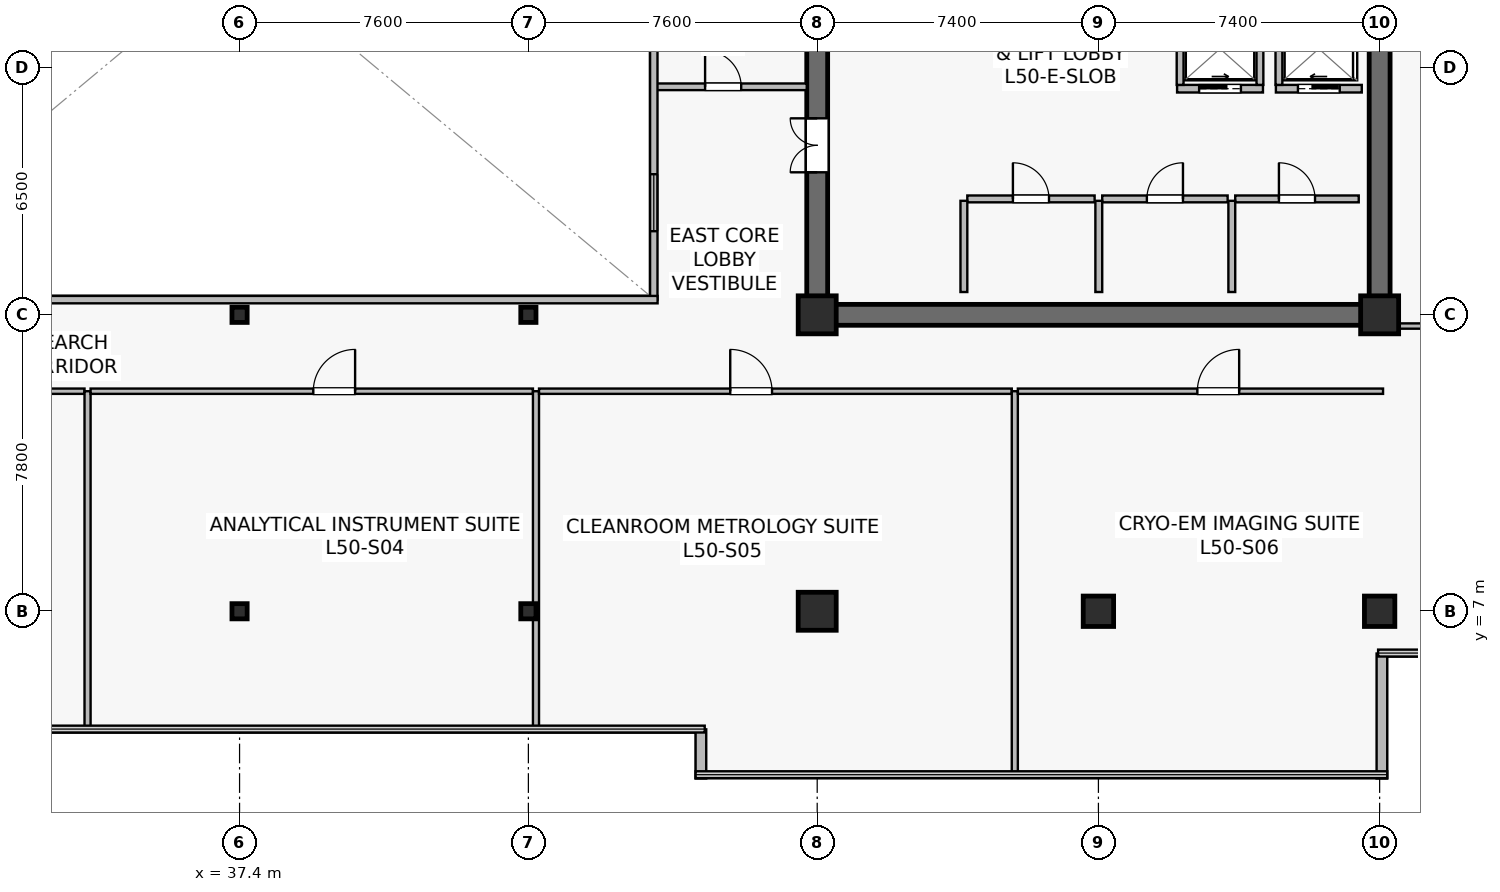
"""IFC4 building model, lengths in metres.
Left out: names, types, materials, properties, quantities, classifications, styles, units other than length and angle.
Written with IfcOpenShell. Run it as: python <this file> out.ifc"""

import sys

from ifc_helpers import new_model, si_unit, direction, frame, frame_2d, origin, origin_2d, place, context, subcontext, project, spatial, rectangle, hollow_rectangle, extrude, source, transform, mapped, element, fill, save


model = new_model("IFC4")
c1 = context("Model", 3, precision=1e-05, world=origin(), true_north=direction((0.0, 1.0)))
c2 = subcontext(c1, "Body", "Model", "MODEL_VIEW")
j1 = project(units=[si_unit("LENGTHUNIT", "METRE"), si_unit("PLANEANGLEUNIT", "RADIAN")], contexts=[c1])
p1 = place(None, origin())
s1 = spatial("IfcSite", under=j1, at=p1, CompositionType="ELEMENT")
p2 = place(p1, origin())
s2 = spatial("IfcBuilding", under=s1, at=p2, CompositionType="ELEMENT")
p3 = place(p2, frame((0.0, 0.0, 209.6)))
s3 = spatial("IfcBuildingStorey", under=s2, at=p3, CompositionType="ELEMENT", Elevation=209.6)
p4 = place(p3, frame((52.325, 14.8, 0.0), z_axis=(0.0, 0.0, 1.0), x_axis=(1.0, 0.0, 0.0)))
e1 = element("IfcWall", 1, at=p4, inside=s3, PredefinedType="SHEAR", context=c2, shape_type="SweptSolid", body=[
    extrude(rectangle(XDim=15.35, YDim=0.55, at=frame_2d((7.675, 0.0))), origin(), (0.0, 0.0, 1.0), 3.8),
])
p5 = place(p3, frame((52.6, 15.075, 0.0), z_axis=(0.0, 0.0, 1.0), x_axis=(0.0, 1.0, 0.0)))
e2 = element("IfcWall", 2, at=p5, inside=s3, PredefinedType="SHEAR", context=c2, shape_type="SweptSolid", body=[
    extrude(rectangle(XDim=18.45, YDim=0.55, at=frame_2d((9.225, 0.0))), origin(), (0.0, 0.0, 1.0), 3.8),
])
p6 = place(p5, frame((3.475, 0.0, 0.0)))
e3 = element("IfcOpeningElement", 3, at=p6, cuts=e2, PredefinedType="OPENING", context=c2, shape_type="SweptSolid", body=[
    extrude(rectangle(XDim=1.42, YDim=2.2, at=frame_2d((0.71, 1.1))), frame((0.0, 0.285, 0.0), z_axis=(0.0, -1.0, 0.0), x_axis=(1.0, 0.0, 0.0)), (0.0, 0.0, 1.0), 0.57),
])
p7 = place(p3, frame((67.4, 15.075, 0.0), z_axis=(0.0, 0.0, 1.0), x_axis=(0.0, 1.0, 0.0)))
e4 = element("IfcWall", 4, at=p7, inside=s3, PredefinedType="SHEAR", context=c2, shape_type="SweptSolid", body=[
    extrude(rectangle(XDim=18.45, YDim=0.55, at=frame_2d((9.225, 0.0))), origin(), (0.0, 0.0, 1.0), 3.8),
])
m1 = source(origin(), c2, "Body", "SweptSolid", [
    extrude(rectangle(XDim=1.0, YDim=1.0, at=origin_2d()), origin(), (0.0, 0.0, 1.0), 4.1),
])
p8 = place(p3, frame((52.6, 7.0, 0.0), z_axis=(0.0, 0.0, 1.0), x_axis=(1.0, 0.0, 0.0)))
e5 = element("IfcColumn", 5, at=p8, inside=s3, PredefinedType="COLUMN", context=c2, shape_type="MappedRepresentation", body=[
    mapped(m1, transform((0.0, 0.0, 0.0), scale=1.0)),
])
m2 = source(origin(), c2, "Body", "SweptSolid", [
    extrude(rectangle(XDim=0.8, YDim=0.8, at=origin_2d()), origin(), (0.0, 0.0, 1.0), 4.1),
])
p9 = place(p3, frame((60.0, 7.0, 0.0), z_axis=(0.0, 0.0, 1.0), x_axis=(1.0, 0.0, 0.0)))
e6 = element("IfcColumn", 6, at=p9, inside=s3, PredefinedType="COLUMN", context=c2, shape_type="MappedRepresentation", body=[
    mapped(m2, transform((0.0, 0.0, 0.0), scale=1.0)),
])
for number, where, z_axis, x_axis in (
    (7, (52.6, 14.8, 0.0), (0.0, 0.0, 1.0), (1.0, 0.0, 0.0)),
    (8, (67.4, 14.8, 0.0), (0.0, 0.0, 1.0), (1.0, 0.0, 0.0)),
):
    element("IfcColumn", number, at=place(p3, frame(where, z_axis=z_axis, x_axis=x_axis)), inside=s3, PredefinedType="COLUMN", context=c2, shape_type="MappedRepresentation", body=[
        mapped(m1, transform((0.0, 0.0, 0.0), scale=1.0)),
    ])
p10 = place(p3, frame((67.4, 7.0, 0.0), z_axis=(0.0, 0.0, 1.0), x_axis=(1.0, 0.0, 0.0)))
e9 = element("IfcColumn", 9, at=p10, inside=s3, PredefinedType="COLUMN", context=c2, shape_type="MappedRepresentation", body=[
    mapped(m2, transform((0.0, 0.0, 0.0), scale=1.0)),
])
m3 = source(origin(), c2, "Body", "SweptSolid", [
    extrude(hollow_rectangle(XDim=0.4, YDim=0.4, WallThickness=0.019, at=origin_2d()), origin(), (0.0, 0.0, 1.0), 4.1),
])
for number, where, z_axis, x_axis in (
    (10, (37.4, 7.0, 0.0), (0.0, 0.0, 1.0), (1.0, 0.0, 0.0)),
    (11, (37.4, 14.8, 0.0), (0.0, 0.0, 1.0), (1.0, 0.0, 0.0)),
    (12, (45.0, 7.0, 0.0), (0.0, 0.0, 1.0), (1.0, 0.0, 0.0)),
    (13, (45.0, 14.8, 0.0), (0.0, 0.0, 1.0), (1.0, 0.0, 0.0)),
):
    element("IfcColumn", number, at=place(p3, frame(where, z_axis=z_axis, x_axis=x_axis)), inside=s3, PredefinedType="COLUMN", context=c2, shape_type="MappedRepresentation", body=[
        mapped(m3, transform((0.0, 0.0, 0.0), scale=1.0)),
    ])
p11 = place(p3, frame((49.54, 3.893, 0.0), z_axis=(0.0, 0.0, 1.0), x_axis=(0.0, -1.0, 0.0)))
e14 = element("IfcWall", 14, at=p11, inside=s3, PredefinedType="STANDARD", context=c2, shape_type="SweptSolid", body=[
    extrude(rectangle(XDim=1.293, YDim=0.28, at=frame_2d((0.646, 0.0))), origin(), (0.0, 0.0, 1.0), 3.8),
])
p12 = place(p3, frame((67.46, 2.6, 0.0), z_axis=(0.0, 0.0, 1.0), x_axis=(0.0, 1.0, 0.0)))
e15 = element("IfcWall", 15, at=p12, inside=s3, PredefinedType="STANDARD", context=c2, shape_type="SweptSolid", body=[
    extrude(rectangle(XDim=3.288, YDim=0.28, at=frame_2d((1.644, 0.0))), origin(), (0.0, 0.0, 1.0), 3.8),
])
p13 = place(p3, frame((64.67, 20.75, 0.0), z_axis=(0.0, 0.0, 1.0), x_axis=(1.0, 0.0, 0.0)))
e16 = element("IfcWall", 16, at=p13, inside=s3, PredefinedType="SOLIDWALL", context=c2, shape_type="SweptSolid", body=[
    extrude(rectangle(XDim=2.26, YDim=0.2, at=frame_2d((1.13, 0.0))), origin(), (0.0, 0.0, 1.0), 3.8),
])
p14 = place(p13, frame((0.58, 0.0, 0.0)))
e17 = element("IfcOpeningElement", 17, at=p14, cuts=e16, PredefinedType="OPENING", context=c2, shape_type="SweptSolid", body=[
    extrude(rectangle(XDim=1.1, YDim=2.22, at=frame_2d((0.55, 1.11))), frame((0.0, 0.11, 0.0), z_axis=(0.0, -1.0, 0.0), x_axis=(1.0, 0.0, 0.0)), (0.0, 0.0, 1.0), 0.22),
])
p15 = place(p3, frame((64.75, 20.85, 0.0), z_axis=(0.0, 0.0, 1.0), x_axis=(0.0, 1.0, 0.0)))
e18 = element("IfcWall", 18, at=p15, inside=s3, PredefinedType="SOLIDWALL", context=c2, shape_type="SweptSolid", body=[
    extrude(rectangle(XDim=1.9, YDim=0.18, at=frame_2d((0.95, 0.0))), origin(), (0.0, 0.0, 1.0), 3.8),
])
p16 = place(p3, frame((62.07, 20.75, 0.0), z_axis=(0.0, 0.0, 1.0), x_axis=(1.0, 0.0, 0.0)))
e19 = element("IfcWall", 19, at=p16, inside=s3, PredefinedType="SOLIDWALL", context=c2, shape_type="SweptSolid", body=[
    extrude(rectangle(XDim=2.26, YDim=0.2, at=frame_2d((1.13, 0.0))), origin(), (0.0, 0.0, 1.0), 3.8),
])
p17 = place(p16, frame((0.58, 0.0, 0.0)))
e20 = element("IfcOpeningElement", 20, at=p17, cuts=e19, PredefinedType="OPENING", context=c2, shape_type="SweptSolid", body=[
    extrude(rectangle(XDim=1.1, YDim=2.22, at=frame_2d((0.55, 1.11))), frame((0.0, 0.11, 0.0), z_axis=(0.0, -1.0, 0.0), x_axis=(1.0, 0.0, 0.0)), (0.0, 0.0, 1.0), 0.22),
])
for number, where, z_axis, x_axis in (
    (21, (62.15, 20.85, 0.0), (0.0, 0.0, 1.0), (0.0, 1.0, 0.0)),
    (22, (64.25, 20.85, 0.0), (0.0, 0.0, 1.0), (0.0, 1.0, 0.0)),
):
    element("IfcWall", number, at=place(p3, frame(where, z_axis=z_axis, x_axis=x_axis)), inside=s3, PredefinedType="SOLIDWALL", context=c2, shape_type="SweptSolid", body=[
        extrude(rectangle(XDim=1.9, YDim=0.18, at=frame_2d((0.95, 0.0))), origin(), (0.0, 0.0, 1.0), 3.8),
    ])
p18 = place(p3, frame((63.6, 17.85, 0.0), z_axis=(0.0, 0.0, 1.0), x_axis=(1.0, 0.0, 0.0)))
e23 = element("IfcWall", 23, at=p18, inside=s3, PredefinedType="SOLIDWALL", context=c2, shape_type="SweptSolid", body=[
    extrude(rectangle(XDim=3.25, YDim=0.18, at=frame_2d((1.625, 0.0))), origin(), (0.0, 0.0, 1.0), 3.8),
])
p19 = place(p18, frame((1.15, 0.0, 0.0)))
e24 = element("IfcOpeningElement", 24, at=p19, cuts=e23, PredefinedType="OPENING", context=c2, shape_type="SweptSolid", body=[
    extrude(rectangle(XDim=0.95, YDim=2.15, at=frame_2d((0.475, 1.075))), frame((0.0, 0.1, 0.0), z_axis=(0.0, -1.0, 0.0), x_axis=(1.0, 0.0, 0.0)), (0.0, 0.0, 1.0), 0.2),
])
p20 = place(p3, frame((63.51, 15.4, 0.0), z_axis=(0.0, 0.0, 1.0), x_axis=(0.0, 1.0, 0.0)))
e25 = element("IfcWall", 25, at=p20, inside=s3, PredefinedType="SOLIDWALL", context=c2, shape_type="SweptSolid", body=[
    extrude(rectangle(XDim=2.4, YDim=0.18, at=frame_2d((1.2, 0.0))), origin(), (0.0, 0.0, 1.0), 3.8),
])
p21 = place(p3, frame((60.1, 17.85, 0.0), z_axis=(0.0, 0.0, 1.0), x_axis=(1.0, 0.0, 0.0)))
e26 = element("IfcWall", 26, at=p21, inside=s3, PredefinedType="SOLIDWALL", context=c2, shape_type="SweptSolid", body=[
    extrude(rectangle(XDim=3.3, YDim=0.18, at=frame_2d((1.65, 0.0))), origin(), (0.0, 0.0, 1.0), 3.197),
])
p22 = place(p21, frame((1.175, 0.0, 0.0)))
e27 = element("IfcOpeningElement", 27, at=p22, cuts=e26, PredefinedType="OPENING", context=c2, shape_type="SweptSolid", body=[
    extrude(rectangle(XDim=0.95, YDim=2.15, at=frame_2d((0.475, 1.075))), frame((0.0, 0.1, 0.0), z_axis=(0.0, -1.0, 0.0), x_axis=(1.0, 0.0, 0.0)), (0.0, 0.0, 1.0), 0.2),
])
p23 = place(p3, frame((60.01, 15.4, 0.0), z_axis=(0.0, 0.0, 1.0), x_axis=(0.0, 1.0, 0.0)))
e28 = element("IfcWall", 28, at=p23, inside=s3, PredefinedType="SOLIDWALL", context=c2, shape_type="SweptSolid", body=[
    extrude(rectangle(XDim=2.4, YDim=0.18, at=frame_2d((1.2, 0.0))), origin(), (0.0, 0.0, 1.0), 3.197),
])
p24 = place(p3, frame((56.55, 17.85, 0.0), z_axis=(0.0, 0.0, 1.0), x_axis=(1.0, 0.0, 0.0)))
e29 = element("IfcWall", 29, at=p24, inside=s3, PredefinedType="SOLIDWALL", context=c2, shape_type="SweptSolid", body=[
    extrude(rectangle(XDim=3.35, YDim=0.18, at=frame_2d((1.675, 0.0))), origin(), (0.0, 0.0, 1.0), 3.197),
])
p25 = place(p24, frame((1.2, 0.0, 0.0)))
e30 = element("IfcOpeningElement", 30, at=p25, cuts=e29, PredefinedType="OPENING", context=c2, shape_type="SweptSolid", body=[
    extrude(rectangle(XDim=0.95, YDim=2.15, at=frame_2d((0.475, 1.075))), frame((0.0, 0.1, 0.0), z_axis=(0.0, -1.0, 0.0), x_axis=(1.0, 0.0, 0.0)), (0.0, 0.0, 1.0), 0.2),
])
p26 = place(p3, frame((56.46, 15.4, 0.0), z_axis=(0.0, 0.0, 1.0), x_axis=(0.0, 1.0, 0.0)))
e31 = element("IfcWall", 31, at=p26, inside=s3, PredefinedType="SOLIDWALL", context=c2, shape_type="SweptSolid", body=[
    extrude(rectangle(XDim=2.4, YDim=0.18, at=frame_2d((1.2, 0.0))), origin(), (0.0, 0.0, 1.0), 3.8),
])
p27 = place(p3, frame((48.3, 20.8, 0.0), z_axis=(0.0, 0.0, 1.0), x_axis=(1.0, 0.0, 0.0)))
e32 = element("IfcWall", 32, at=p27, inside=s3, PredefinedType="PARTITIONING", context=c2, shape_type="SweptSolid", body=[
    extrude(rectangle(XDim=4.025, YDim=0.175, at=frame_2d((2.012, 0.0))), origin(), (0.0, 0.0, 1.0), 3.8),
])
p28 = place(p27, frame((1.35, 0.0, 0.0)))
e33 = element("IfcOpeningElement", 33, at=p28, cuts=e32, PredefinedType="OPENING", context=c2, shape_type="SweptSolid", body=[
    extrude(rectangle(XDim=0.95, YDim=2.15, at=frame_2d((0.475, 1.075))), frame((0.0, 0.098, 0.0), z_axis=(0.0, -1.0, 0.0), x_axis=(1.0, 0.0, 0.0)), (0.0, 0.0, 1.0), 0.195),
])
p29 = place(p3, frame((48.3, 15.2, 0.0), z_axis=(0.0, 0.0, 1.0), x_axis=(0.0, 1.0, 0.0)))
e34 = element("IfcWall", 34, at=p29, inside=s3, PredefinedType="SOLIDWALL", context=c2, shape_type="SweptSolid", body=[
    extrude(rectangle(XDim=18.2, YDim=0.195, at=frame_2d((9.1, 0.0))), origin(), (0.0, 0.0, 1.0), 3.8),
])
p30 = place(p29, frame((1.8, 0.0, 0.9)))
e35 = element("IfcOpeningElement", 35, at=p30, cuts=e34, PredefinedType="OPENING", context=c2, shape_type="SweptSolid", body=[
    extrude(rectangle(XDim=1.5, YDim=1.4, at=frame_2d((0.75, 0.7))), frame((0.0, 0.107, 0.0), z_axis=(0.0, -1.0, 0.0), x_axis=(1.0, 0.0, 0.0)), (0.0, 0.0, 1.0), 0.215),
])
p31 = place(p29, frame((13.2, 0.0, 0.9)))
e36 = element("IfcOpeningElement", 36, at=p31, cuts=e34, PredefinedType="OPENING", context=c2, shape_type="SweptSolid", body=[
    extrude(rectangle(XDim=1.5, YDim=1.4, at=frame_2d((0.75, 0.7))), frame((0.0, 0.107, 0.0), z_axis=(0.0, -1.0, 0.0), x_axis=(1.0, 0.0, 0.0)), (0.0, 0.0, 1.0), 0.215),
])
p32 = place(p3, frame((26.4, 15.2, 0.0), z_axis=(0.0, 0.0, 1.0), x_axis=(1.0, 0.0, 0.0)))
e37 = element("IfcWall", 37, at=p32, inside=s3, PredefinedType="SOLIDWALL", context=c2, shape_type="SweptSolid", body=[
    extrude(rectangle(XDim=22.0, YDim=0.195, at=frame_2d((11.0, 0.0))), origin(), (0.0, 0.0, 1.0), 3.8),
])
p33 = place(p3, frame((22.08, 12.79, 0.0), z_axis=(0.0, 0.0, 1.0), x_axis=(1.0, 0.0, 0.0)))
e38 = element("IfcWall", 38, at=p33, inside=s3, PredefinedType="PARTITIONING", context=c2, shape_type="SweptSolid", body=[
    extrude(rectangle(XDim=11.24, YDim=0.14, at=frame_2d((5.62, 0.0))), origin(), (0.0, 0.0, 1.0), 3.197),
])
p34 = place(p33, frame((4.504, 0.0, 0.0)))
e39 = element("IfcOpeningElement", 39, at=p34, cuts=e38, PredefinedType="OPENING", context=c2, shape_type="SweptSolid", body=[
    extrude(rectangle(XDim=1.1, YDim=2.18, at=frame_2d((0.55, 1.09))), frame((0.0, 0.08, 0.0), z_axis=(0.0, -1.0, 0.0), x_axis=(1.0, 0.0, 0.0)), (0.0, 0.0, 1.0), 0.16),
])
p35 = place(p3, frame((33.4, 3.91, 0.0), z_axis=(0.0, 0.0, 1.0), x_axis=(0.0, 1.0, 0.0)))
e40 = element("IfcWall", 40, at=p35, inside=s3, PredefinedType="PARTITIONING", context=c2, shape_type="SweptSolid", body=[
    extrude(rectangle(XDim=8.88, YDim=0.16, at=frame_2d((4.44, 0.0))), origin(), (0.0, 0.0, 1.0), 3.135),
])
p36 = place(p3, frame((33.48, 12.79, 0.0), z_axis=(0.0, 0.0, 1.0), x_axis=(1.0, 0.0, 0.0)))
e41 = element("IfcWall", 41, at=p36, inside=s3, PredefinedType="PARTITIONING", context=c2, shape_type="SweptSolid", body=[
    extrude(rectangle(XDim=11.64, YDim=0.14, at=frame_2d((5.82, 0.0))), origin(), (0.0, 0.0, 1.0), 3.197),
])
p37 = place(p36, frame((5.86, 0.0, 0.0)))
e42 = element("IfcOpeningElement", 42, at=p37, cuts=e41, PredefinedType="OPENING", context=c2, shape_type="SweptSolid", body=[
    extrude(rectangle(XDim=1.1, YDim=2.18, at=frame_2d((0.55, 1.09))), frame((0.0, 0.08, 0.0), z_axis=(0.0, -1.0, 0.0), x_axis=(1.0, 0.0, 0.0)), (0.0, 0.0, 1.0), 0.16),
])
p38 = place(p3, frame((45.2, 3.91, 0.0), z_axis=(0.0, 0.0, 1.0), x_axis=(0.0, 1.0, 0.0)))
e43 = element("IfcWall", 43, at=p38, inside=s3, PredefinedType="PARTITIONING", context=c2, shape_type="SweptSolid", body=[
    extrude(rectangle(XDim=8.88, YDim=0.16, at=frame_2d((4.44, 0.0))), origin(), (0.0, 0.0, 1.0), 3.135),
])
p39 = place(p3, frame((45.28, 12.79, 0.0), z_axis=(0.0, 0.0, 1.0), x_axis=(1.0, 0.0, 0.0)))
e44 = element("IfcWall", 44, at=p39, inside=s3, PredefinedType="PARTITIONING", context=c2, shape_type="SweptSolid", body=[
    extrude(rectangle(XDim=12.44, YDim=0.14, at=frame_2d((6.22, 0.0))), origin(), (0.0, 0.0, 1.0), 3.197),
])
p40 = place(p39, frame((5.031, 0.0, 0.0)))
e45 = element("IfcOpeningElement", 45, at=p40, cuts=e44, PredefinedType="OPENING", context=c2, shape_type="SweptSolid", body=[
    extrude(rectangle(XDim=1.1, YDim=2.18, at=frame_2d((0.55, 1.09))), frame((0.0, 0.08, 0.0), z_axis=(0.0, -1.0, 0.0), x_axis=(1.0, 0.0, 0.0)), (0.0, 0.0, 1.0), 0.16),
])
p41 = place(p3, frame((57.8, 2.71, 0.0), z_axis=(0.0, 0.0, 1.0), x_axis=(0.0, 1.0, 0.0)))
e46 = element("IfcWall", 46, at=p41, inside=s3, PredefinedType="PARTITIONING", context=c2, shape_type="SweptSolid", body=[
    extrude(rectangle(XDim=10.08, YDim=0.16, at=frame_2d((5.04, 0.0))), origin(), (0.0, 0.0, 1.0), 3.135),
])
p42 = place(p3, frame((57.88, 12.79, 0.0), z_axis=(0.0, 0.0, 1.0), x_axis=(1.0, 0.0, 0.0)))
e47 = element("IfcWall", 47, at=p42, inside=s3, PredefinedType="PARTITIONING", context=c2, shape_type="SweptSolid", body=[
    extrude(rectangle(XDim=9.61, YDim=0.14, at=frame_2d((4.805, 0.0))), origin(), (0.0, 0.0, 1.0), 3.197),
])
p43 = place(p42, frame((4.724, 0.0, 0.0)))
e48 = element("IfcOpeningElement", 48, at=p43, cuts=e47, PredefinedType="OPENING", context=c2, shape_type="SweptSolid", body=[
    extrude(rectangle(XDim=1.1, YDim=2.18, at=frame_2d((0.55, 1.09))), frame((0.0, 0.08, 0.0), z_axis=(0.0, -1.0, 0.0), x_axis=(1.0, 0.0, 0.0)), (0.0, 0.0, 1.0), 0.16),
])
p44 = place(p3, frame((67.78, 14.505, 0.0), z_axis=(0.0, 0.0, 1.0), x_axis=(1.0, 0.0, 0.0)))
e49 = element("IfcWall", 49, at=p44, inside=s3, PredefinedType="PARTITIONING", context=c2, shape_type="SweptSolid", body=[
    extrude(rectangle(XDim=2.91, YDim=0.14, at=frame_2d((1.455, 0.0))), origin(), (0.0, 0.0, 1.0), 3.8),
])
p45 = place(p44, frame((1.005, 0.0, 0.0)))
e50 = element("IfcOpeningElement", 50, at=p45, cuts=e49, PredefinedType="OPENING", context=c2, shape_type="SweptSolid", body=[
    extrude(rectangle(XDim=0.9, YDim=2.1, at=frame_2d((0.45, 1.05))), frame((0.0, 0.08, 0.0), z_axis=(0.0, -1.0, 0.0), x_axis=(1.0, 0.0, 0.0)), (0.0, 0.0, 1.0), 0.16),
])
m4 = source(origin(), c2, "Body", "SweptSolid", [
    extrude(rectangle(XDim=1.5, YDim=1.4, at=frame_2d((0.75, 0.7))), frame((0.0, 0.03, 0.0), z_axis=(0.0, -1.0, 0.0), x_axis=(1.0, 0.0, 0.0)), (0.0, 0.0, 1.0), 0.06),
])
p46 = place(p30, origin())
e51 = element("IfcWindow", 51, at=p46, inside=s3, PartitioningType="SINGLE_PANEL", PredefinedType="WINDOW", context=c2, shape_type="MappedRepresentation", body=[
    mapped(m4, transform((0.0, 0.0, 0.0), scale=1.0)),
])
fill(e35, e51)
m5 = source(origin(), c2, "Body", "SweptSolid", [
    extrude(rectangle(XDim=1.1, YDim=2.22, at=frame_2d((0.55, 1.11))), frame((0.0, 0.025, 0.0), z_axis=(0.0, -1.0, 0.0), x_axis=(1.0, 0.0, 0.0)), (0.0, 0.0, 1.0), 0.05),
])
p47 = place(p14, origin())
e52 = element("IfcDoor", 52, at=p47, inside=s3, OperationType="SLIDING_TO_LEFT", PredefinedType="USERDEFINED", context=c2, shape_type="MappedRepresentation", body=[
    mapped(m5, transform((0.0, 0.0, 0.0), scale=1.0)),
])
fill(e17, e52)
p48 = place(p17, origin())
e53 = element("IfcDoor", 53, at=p48, inside=s3, OperationType="SLIDING_TO_RIGHT", PredefinedType="USERDEFINED", context=c2, shape_type="MappedRepresentation", body=[
    mapped(m5, transform((0.0, 0.0, 0.0), scale=1.0)),
])
fill(e20, e53)
m6 = source(origin(), c2, "Body", "SweptSolid", [
    extrude(rectangle(XDim=0.95, YDim=2.15, at=frame_2d((0.475, 1.075))), frame((0.0, 0.025, 0.0), z_axis=(0.0, -1.0, 0.0), x_axis=(1.0, 0.0, 0.0)), (0.0, 0.0, 1.0), 0.05),
])
p49 = place(p19, origin())
e54 = element("IfcDoor", 54, at=p49, inside=s3, OperationType="SINGLE_SWING_LEFT", PredefinedType="DOOR", context=c2, shape_type="MappedRepresentation", body=[
    mapped(m6, transform((0.0, 0.0, 0.0), scale=1.0)),
])
fill(e24, e54)
p50 = place(p22, origin())
e55 = element("IfcDoor", 55, at=p50, inside=s3, OperationType="SINGLE_SWING_RIGHT", PredefinedType="DOOR", context=c2, shape_type="MappedRepresentation", body=[
    mapped(m6, transform((0.0, 0.0, 0.0), scale=1.0)),
])
fill(e27, e55)
p51 = place(p25, origin())
e56 = element("IfcDoor", 56, at=p51, inside=s3, OperationType="SINGLE_SWING_LEFT", PredefinedType="DOOR", context=c2, shape_type="MappedRepresentation", body=[
    mapped(m6, transform((0.0, 0.0, 0.0), scale=1.0)),
])
fill(e30, e56)
m7 = source(origin(), c2, "Body", "SweptSolid", [
    extrude(rectangle(XDim=1.42, YDim=2.2, at=frame_2d((0.71, 1.1))), frame((0.0, 0.025, 0.0), z_axis=(0.0, -1.0, 0.0), x_axis=(1.0, 0.0, 0.0)), (0.0, 0.0, 1.0), 0.05),
])
p52 = place(p6, origin())
e57 = element("IfcDoor", 57, at=p52, inside=s3, OperationType="DOUBLE_DOOR_SINGLE_SWING", PredefinedType="DOOR", context=c2, shape_type="MappedRepresentation", body=[
    mapped(m7, transform((0.0, 0.0, 0.0), scale=1.0)),
])
fill(e3, e57)
p53 = place(p28, origin())
e58 = element("IfcDoor", 58, at=p53, inside=s3, OperationType="SINGLE_SWING_LEFT", PredefinedType="DOOR", context=c2, shape_type="MappedRepresentation", body=[
    mapped(m6, transform((0.0, 0.0, 0.0), scale=1.0)),
])
fill(e33, e58)
m8 = source(origin(), c2, "Body", "SweptSolid", [
    extrude(rectangle(XDim=1.1, YDim=2.18, at=frame_2d((0.55, 1.09))), frame((0.0, 0.025, 0.0), z_axis=(0.0, -1.0, 0.0), x_axis=(1.0, 0.0, 0.0)), (0.0, 0.0, 1.0), 0.05),
])
p54 = place(p37, origin())
e59 = element("IfcDoor", 59, at=p54, inside=s3, OperationType="SINGLE_SWING_RIGHT", PredefinedType="DOOR", context=c2, shape_type="MappedRepresentation", body=[
    mapped(m8, transform((0.0, 0.0, 0.0), scale=1.0)),
])
fill(e42, e59)
p55 = place(p40, origin())
e60 = element("IfcDoor", 60, at=p55, inside=s3, OperationType="SINGLE_SWING_LEFT", PredefinedType="DOOR", context=c2, shape_type="MappedRepresentation", body=[
    mapped(m8, transform((0.0, 0.0, 0.0), scale=1.0)),
])
fill(e45, e60)
p56 = place(p43, origin())
e61 = element("IfcDoor", 61, at=p56, inside=s3, OperationType="SINGLE_SWING_RIGHT", PredefinedType="DOOR", context=c2, shape_type="MappedRepresentation", body=[
    mapped(m8, transform((0.0, 0.0, 0.0), scale=1.0)),
])
fill(e48, e61)
save(model, sys.argv[1])
